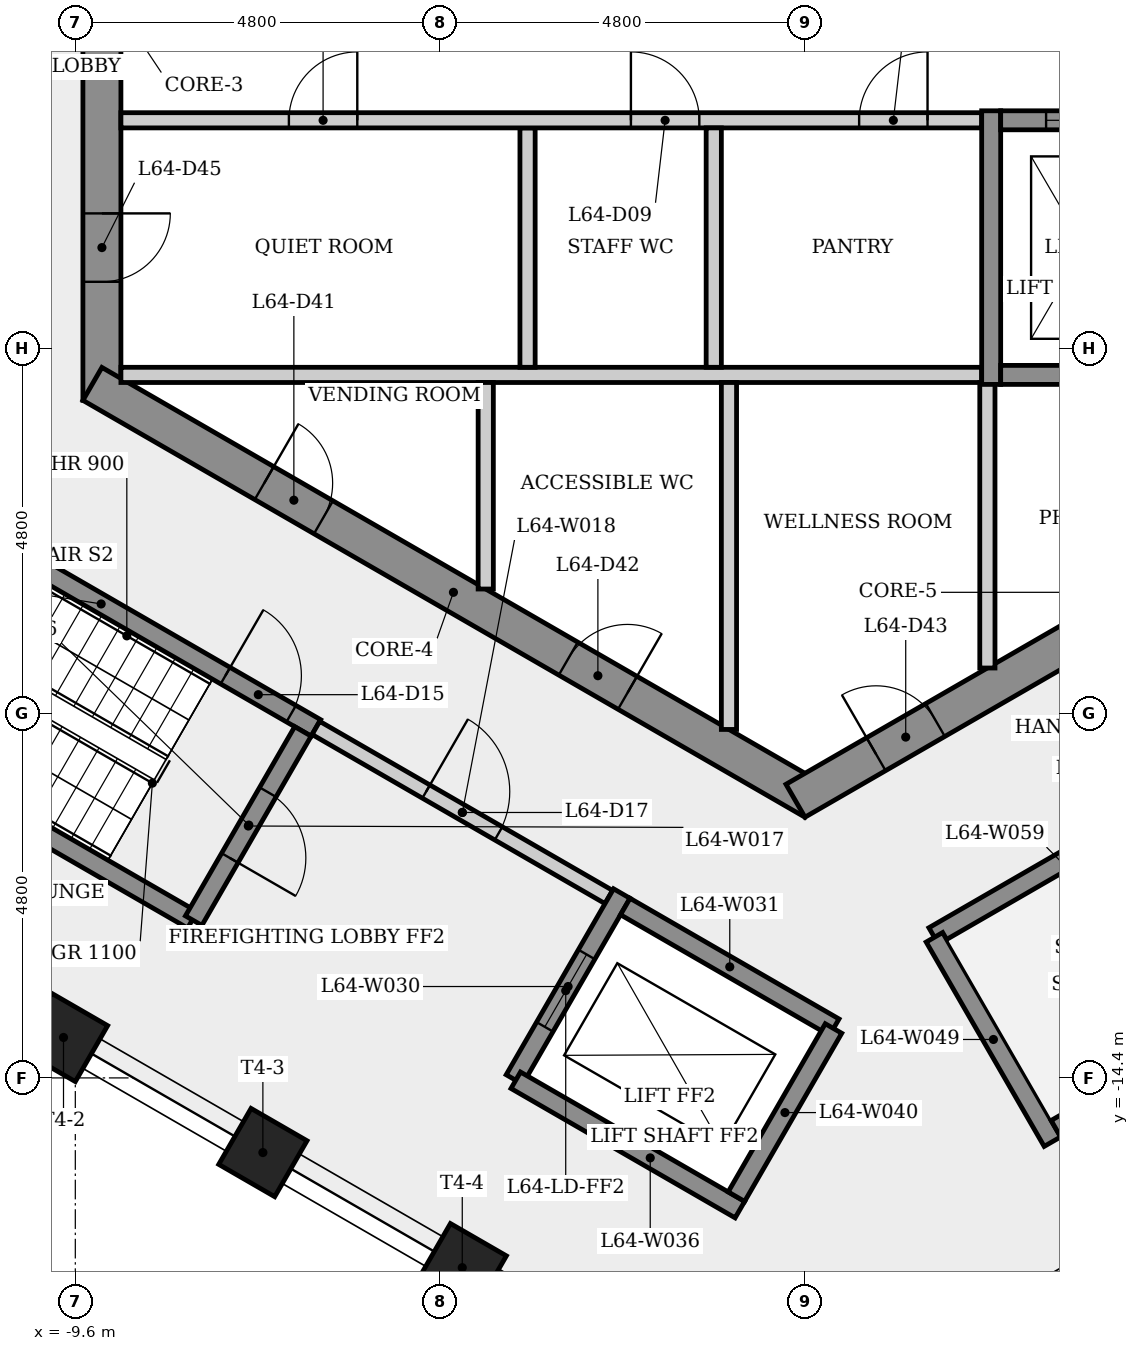
"""IFC4 building model, lengths in metres.
Left out: names, types, materials, properties, quantities, classifications, styles, units other than length and angle.
Written with IfcOpenShell. Run it as: python <this file> out.ifc"""

import sys

from ifc_helpers import new_model, si_unit, direction, frame, frame_2d, origin, origin_2d, place, context, subcontext, project, spatial, rectangle, extrude, element, fill, save


model = new_model("IFC4")
c1 = context("Model", 3, precision=1e-05, world=origin(), true_north=direction((0.0, 1.0)))
c2 = subcontext(c1, "Body", "Model", "MODEL_VIEW")
j1 = project(units=[si_unit("LENGTHUNIT", "METRE"), si_unit("PLANEANGLEUNIT", "RADIAN")], contexts=[c1])
p1 = place(None, origin())
s1 = spatial("IfcSite", under=j1, at=p1, CompositionType="ELEMENT")
p2 = place(p1, origin())
s2 = spatial("IfcBuilding", under=s1, at=p2, CompositionType="ELEMENT")
p3 = place(p2, frame((0.0, 0.0, 239.3)))
s3 = spatial("IfcBuildingStorey", under=s2, at=p3, CompositionType="ELEMENT", Elevation=239.3)
p4 = place(p3, frame((-9.25, 5.485, 0.0), z_axis=(0.0, 0.0, 1.0), x_axis=(0.0, -1.0, 0.0)))
e1 = element("IfcWall", 1, at=p4, inside=s3, PredefinedType="SHEAR", context=c2, shape_type="SweptSolid", body=[
    extrude(rectangle(XDim=10.97, YDim=0.5, at=frame_2d((5.485, 0.0))), origin(), (0.0, 0.0, 1.0), 3.4),
])
p5 = place(p4, frame((8.51, 0.0, 0.0)))
e2 = element("IfcOpeningElement", 2, at=p5, cuts=e1, PredefinedType="OPENING", context=c2, shape_type="SweptSolid", body=[
    extrude(rectangle(XDim=0.9, YDim=2.1, at=frame_2d((0.45, 1.05))), frame((0.0, 0.26, 0.0), z_axis=(0.0, -1.0, 0.0), x_axis=(1.0, 0.0, 0.0)), (0.0, 0.0, 1.0), 0.52),
])
p6 = place(p4, frame((4.685, 0.0, 0.0)))
e3 = element("IfcOpeningElement", 3, at=p6, cuts=e1, PredefinedType="OPENING", context=c2, shape_type="SweptSolid", body=[
    extrude(rectangle(XDim=1.6, YDim=2.1, at=frame_2d((0.8, 1.05))), frame((0.0, 0.26, 0.0), z_axis=(0.0, -1.0, 0.0), x_axis=(1.0, 0.0, 0.0)), (0.0, 0.0, 1.0), 0.52),
])
p7 = place(p3, frame((-9.375, -5.268, 0.0), z_axis=(0.0, 0.0, 1.0), x_axis=(0.866023993627, -0.500002442456, 0.0)))
e4 = element("IfcWall", 4, at=p7, inside=s3, PredefinedType="SHEAR", context=c2, shape_type="SweptSolid", body=[
    extrude(rectangle(XDim=10.97, YDim=0.5, at=frame_2d((5.485, 0.0))), origin(), (0.0, 0.0, 1.0), 3.4),
])
p8 = place(p7, frame((2.611, 0.0, 0.0)))
e5 = element("IfcOpeningElement", 5, at=p8, cuts=e4, PredefinedType="OPENING", context=c2, shape_type="SweptSolid", body=[
    extrude(rectangle(XDim=0.9, YDim=2.1, at=frame_2d((0.45, 1.05))), frame((0.0, 0.26, 0.0), z_axis=(0.0, -1.0, 0.0), x_axis=(1.0, 0.0, 0.0)), (0.0, 0.0, 1.0), 0.52),
])
p9 = place(p7, frame((7.229, 0.0, 0.0)))
e6 = element("IfcOpeningElement", 6, at=p9, cuts=e4, PredefinedType="OPENING", context=c2, shape_type="SweptSolid", body=[
    extrude(rectangle(XDim=0.9, YDim=2.1, at=frame_2d((0.45, 1.05))), frame((0.0, 0.26, 0.0), z_axis=(0.0, -1.0, 0.0), x_axis=(1.0, 0.0, 0.0)), (0.0, 0.0, 1.0), 0.52),
])
p10 = place(p3, frame((-0.125, -10.753, 0.0), z_axis=(0.0, 0.0, 1.0), x_axis=(0.866023993627, 0.500002442456, 0.0)))
e7 = element("IfcWall", 7, at=p10, inside=s3, PredefinedType="SHEAR", context=c2, shape_type="SweptSolid", body=[
    extrude(rectangle(XDim=10.97, YDim=0.5, at=frame_2d((5.485, 0.0))), origin(), (0.0, 0.0, 1.0), 3.4),
])
p11 = place(p10, frame((1.225, 0.0, 0.0)))
e8 = element("IfcOpeningElement", 8, at=p11, cuts=e7, PredefinedType="OPENING", context=c2, shape_type="SweptSolid", body=[
    extrude(rectangle(XDim=0.9, YDim=2.1, at=frame_2d((0.45, 1.05))), frame((0.0, 0.26, 0.0), z_axis=(0.0, -1.0, 0.0), x_axis=(1.0, 0.0, 0.0)), (0.0, 0.0, 1.0), 0.52),
])
p12 = place(p10, frame((8.119, 0.0, 0.0)))
e9 = element("IfcOpeningElement", 9, at=p12, cuts=e7, PredefinedType="OPENING", context=c2, shape_type="SweptSolid", body=[
    extrude(rectangle(XDim=0.9, YDim=2.1, at=frame_2d((0.45, 1.05))), frame((0.0, 0.26, 0.0), z_axis=(0.0, -1.0, 0.0), x_axis=(1.0, 0.0, 0.0)), (0.0, 0.0, 1.0), 0.52),
])
for number, where, z_axis, x_axis in (
    (10, (-9.755, -13.868, 0.0), (0.0, 0.0, 1.0), (-0.5, -0.866, 0.0)),
    (11, (-7.132, -15.382, 0.0), (0.0, 0.0, 1.0), (-0.5, -0.866, 0.0)),
    (12, (-4.509, -16.897, 0.0), (0.0, 0.0, 1.0), (-0.5, -0.866, 0.0)),
):
    element("IfcColumn", number, at=place(p3, frame(where, z_axis=z_axis, x_axis=x_axis)), inside=s3, PredefinedType="COLUMN", context=c2, shape_type="SweptSolid", body=[
        extrude(rectangle(XDim=0.85, YDim=0.85, at=origin_2d()), origin(), (0.0, 0.0, 1.0), 3.4),
    ])
p13 = place(p3, frame((-12.085, -6.532, 0.0), z_axis=(0.0, 0.0, 1.0), x_axis=(0.866031063448, -0.499990197047, 0.0)))
e13 = element("IfcWall", 13, at=p13, inside=s3, PredefinedType="SHEAR", context=c2, shape_type="SweptSolid", body=[
    extrude(rectangle(XDim=6.525, YDim=0.25, at=frame_2d((3.263, 0.0))), origin(), (0.0, 0.0, 1.0), 3.05),
])
p14 = place(p13, frame((5.15, 0.0, 0.0)))
e14 = element("IfcOpeningElement", 14, at=p14, cuts=e13, PredefinedType="OPENING", context=c2, shape_type="SweptSolid", body=[
    extrude(rectangle(XDim=1.0, YDim=2.1, at=frame_2d((0.5, 1.05))), frame((0.0, 0.135, 0.0), z_axis=(0.0, -1.0, 0.0), x_axis=(1.0, 0.0, 0.0)), (0.0, 0.0, 1.0), 0.27),
])
p15 = place(p3, frame((-9.0, -5.15, 0.0), z_axis=(0.0, 0.0, 1.0), x_axis=(1.0, 0.0, 0.0)))
e15 = element("IfcWall", 15, at=p15, inside=s3, PredefinedType="PARTITIONING", context=c2, shape_type="SweptSolid", body=[
    extrude(rectangle(XDim=11.325, YDim=0.2, at=frame_2d((5.663, 0.0))), origin(), (0.0, 0.0, 1.0), 3.05),
])
p16 = place(p3, frame((-8.06, -12.321, 0.0), z_axis=(0.0, 0.0, 1.0), x_axis=(-0.866029591389, 0.499992746786, 0.0)))
e16 = element("IfcWall", 16, at=p16, inside=s3, PredefinedType="SHEAR", context=c2, shape_type="SweptSolid", body=[
    extrude(rectangle(XDim=6.255, YDim=0.25, at=frame_2d((3.127, 0.0))), origin(), (0.0, 0.0, 1.0), 3.05),
])
p17 = place(p3, frame((-6.605, -9.841, 0.0), z_axis=(0.0, 0.0, 1.0), x_axis=(-0.500011588718, -0.866018712932, 0.0)))
e17 = element("IfcWall", 17, at=p17, inside=s3, PredefinedType="SHEAR", context=c2, shape_type="SweptSolid", body=[
    extrude(rectangle(XDim=2.875, YDim=0.25, at=frame_2d((1.438, 0.0))), origin(), (0.0, 0.0, 1.0), 3.05),
])
p18 = place(p17, frame((0.923, 0.0, 0.0)))
e18 = element("IfcOpeningElement", 18, at=p18, cuts=e17, PredefinedType="OPENING", context=c2, shape_type="SweptSolid", body=[
    extrude(rectangle(XDim=1.0, YDim=2.1, at=frame_2d((0.5, 1.05))), frame((0.0, 0.135, 0.0), z_axis=(0.0, -1.0, 0.0), x_axis=(1.0, 0.0, 0.0)), (0.0, 0.0, 1.0), 0.27),
])
p19 = place(p3, frame((-6.435, -9.795, 0.0), z_axis=(0.0, 0.0, 1.0), x_axis=(0.866012907634, -0.500021643343, 0.0)))
e19 = element("IfcWall", 19, at=p19, inside=s3, PredefinedType="PARTITIONING", context=c2, shape_type="SweptSolid", body=[
    extrude(rectangle(XDim=4.45, YDim=0.2, at=frame_2d((2.225, 0.0))), origin(), (0.0, 0.0, 1.0), 3.05),
])
p20 = place(p19, frame((1.675, 0.0, 0.0)))
e20 = element("IfcOpeningElement", 20, at=p20, cuts=e19, PredefinedType="OPENING", context=c2, shape_type="SweptSolid", body=[
    extrude(rectangle(XDim=1.1, YDim=2.1, at=frame_2d((0.55, 1.05))), frame((0.0, 0.11, 0.0), z_axis=(0.0, -1.0, 0.0), x_axis=(1.0, 0.0, 0.0)), (0.0, 0.0, 1.0), 0.22),
])
p21 = place(p3, frame((-4.2, -5.25, 0.0), z_axis=(0.0, 0.0, 1.0), x_axis=(0.0, -1.0, 0.0)))
e21 = element("IfcWall", 21, at=p21, inside=s3, PredefinedType="PARTITIONING", context=c2, shape_type="SweptSolid", body=[
    extrude(rectangle(XDim=2.717, YDim=0.2, at=frame_2d((1.359, 0.0))), origin(), (0.0, 0.0, 1.0), 3.05),
])
p22 = place(p3, frame((-3.65, -1.9, 0.0), z_axis=(0.0, 0.0, 1.0), x_axis=(0.0, -1.0, 0.0)))
e22 = element("IfcWall", 22, at=p22, inside=s3, PredefinedType="PARTITIONING", context=c2, shape_type="SweptSolid", body=[
    extrude(rectangle(XDim=3.15, YDim=0.2, at=frame_2d((1.575, 0.0))), origin(), (0.0, 0.0, 1.0), 3.05),
])
p23 = place(p3, frame((-9.0, -1.8, 0.0), z_axis=(0.0, 0.0, 1.0), x_axis=(1.0, 0.0, 0.0)))
e23 = element("IfcWall", 23, at=p23, inside=s3, PredefinedType="PARTITIONING", context=c2, shape_type="SweptSolid", body=[
    extrude(rectangle(XDim=11.325, YDim=0.2, at=frame_2d((5.663, 0.0))), origin(), (0.0, 0.0, 1.0), 3.05),
])
p24 = place(p23, frame((2.21, 0.0, 0.0)))
e24 = element("IfcOpeningElement", 24, at=p24, cuts=e23, PredefinedType="OPENING", context=c2, shape_type="SweptSolid", body=[
    extrude(rectangle(XDim=0.9, YDim=2.1, at=frame_2d((0.45, 1.05))), frame((0.0, 0.11, 0.0), z_axis=(0.0, -1.0, 0.0), x_axis=(1.0, 0.0, 0.0)), (0.0, 0.0, 1.0), 0.22),
])
p25 = place(p23, frame((6.71, 0.0, 0.0)))
e25 = element("IfcOpeningElement", 25, at=p25, cuts=e23, PredefinedType="OPENING", context=c2, shape_type="SweptSolid", body=[
    extrude(rectangle(XDim=0.9, YDim=2.1, at=frame_2d((0.45, 1.05))), frame((0.0, 0.11, 0.0), z_axis=(0.0, -1.0, 0.0), x_axis=(1.0, 0.0, 0.0)), (0.0, 0.0, 1.0), 0.22),
])
p26 = place(p23, frame((9.713, 0.0, 0.0)))
e26 = element("IfcOpeningElement", 26, at=p26, cuts=e23, PredefinedType="OPENING", context=c2, shape_type="SweptSolid", body=[
    extrude(rectangle(XDim=0.9, YDim=2.1, at=frame_2d((0.45, 1.05))), frame((0.0, 0.11, 0.0), z_axis=(0.0, -1.0, 0.0), x_axis=(1.0, 0.0, 0.0)), (0.0, 0.0, 1.0), 0.22),
])
p27 = place(p3, frame((-2.41, -11.974, 0.0), z_axis=(0.0, 0.0, 1.0), x_axis=(-0.49998675294, -0.866033051843, 0.0)))
e27 = element("IfcWall", 27, at=p27, inside=s3, PredefinedType="SHEAR", context=c2, shape_type="SweptSolid", body=[
    extrude(rectangle(XDim=2.825, YDim=0.25, at=frame_2d((1.413, 0.0))), origin(), (0.0, 0.0, 1.0), 3.05),
])
p28 = place(p27, frame((0.926, 0.0, 0.0)))
e28 = element("IfcOpeningElement", 28, at=p28, cuts=e27, PredefinedType="OPENING", context=c2, shape_type="SweptSolid", body=[
    extrude(rectangle(XDim=1.1, YDim=2.1, at=frame_2d((0.55, 1.05))), frame((0.0, 0.135, 0.0), z_axis=(0.0, -1.0, 0.0), x_axis=(1.0, 0.0, 0.0)), (0.0, 0.0, 1.0), 0.27),
])
p29 = place(p3, frame((-2.364, -12.145, 0.0), z_axis=(0.0, 0.0, 1.0), x_axis=(0.866048579423, -0.499959856469, 0.0)))
e29 = element("IfcWall", 29, at=p29, inside=s3, PredefinedType="SHEAR", context=c2, shape_type="SweptSolid", body=[
    extrude(rectangle(XDim=3.175, YDim=0.25, at=frame_2d((1.587, 0.0))), origin(), (0.0, 0.0, 1.0), 3.4),
])
p30 = place(p3, frame((-1.2, -1.9, 0.0), z_axis=(0.0, 0.0, 1.0), x_axis=(0.0, -1.0, 0.0)))
e30 = element("IfcWall", 30, at=p30, inside=s3, PredefinedType="PARTITIONING", context=c2, shape_type="SweptSolid", body=[
    extrude(rectangle(XDim=3.15, YDim=0.2, at=frame_2d((1.575, 0.0))), origin(), (0.0, 0.0, 1.0), 3.05),
])
p31 = place(p3, frame((-1.0, -5.25, 0.0), z_axis=(0.0, 0.0, 1.0), x_axis=(0.0, -1.0, 0.0)))
e31 = element("IfcWall", 31, at=p31, inside=s3, PredefinedType="PARTITIONING", context=c2, shape_type="SweptSolid", body=[
    extrude(rectangle(XDim=4.565, YDim=0.2, at=frame_2d((2.282, 0.0))), origin(), (0.0, 0.0, 1.0), 3.05),
])
p32 = place(p3, frame((-0.856, -16.133, 0.0), z_axis=(0.0, 0.0, 1.0), x_axis=(-0.866032748241, 0.499987278812, 0.0)))
e32 = element("IfcWall", 32, at=p32, inside=s3, PredefinedType="SHEAR", context=c2, shape_type="SweptSolid", body=[
    extrude(rectangle(XDim=3.405, YDim=0.25, at=frame_2d((1.702, 0.0))), origin(), (0.0, 0.0, 1.0), 3.05),
])
p33 = place(p3, frame((0.375, -13.75, 0.0), z_axis=(0.0, 0.0, 1.0), x_axis=(-0.50003400563, -0.866005769735, 0.0)))
e33 = element("IfcWall", 33, at=p33, inside=s3, PredefinedType="SHEAR", context=c2, shape_type="SweptSolid", body=[
    extrude(rectangle(XDim=2.555, YDim=0.25, at=frame_2d((1.277, 0.0))), origin(), (0.0, 0.0, 1.0), 3.4),
])
p34 = place(p3, frame((1.693, -12.532, 0.0), z_axis=(0.0, 0.0, 1.0), x_axis=(0.866031063448, 0.499990197047, 0.0)))
e34 = element("IfcWall", 34, at=p34, inside=s3, PredefinedType="SHEAR", context=c2, shape_type="SweptSolid", body=[
    extrude(rectangle(XDim=6.525, YDim=0.25, at=frame_2d((3.263, 0.0))), origin(), (0.0, 0.0, 1.0), 3.05),
])
p35 = place(p34, frame((5.15, 0.0, 0.0)))
e35 = element("IfcOpeningElement", 35, at=p35, cuts=e34, PredefinedType="OPENING", context=c2, shape_type="SweptSolid", body=[
    extrude(rectangle(XDim=1.0, YDim=2.1, at=frame_2d((0.5, 1.05))), frame((0.0, 0.135, 0.0), z_axis=(0.0, -1.0, 0.0), x_axis=(1.0, 0.0, 0.0)), (0.0, 0.0, 1.0), 0.27),
])
p36 = place(p3, frame((2.4, -5.25, 0.0), z_axis=(0.0, 0.0, 1.0), x_axis=(0.0, -1.0, 0.0)))
e36 = element("IfcWall", 36, at=p36, inside=s3, PredefinedType="PARTITIONING", context=c2, shape_type="SweptSolid", body=[
    extrude(rectangle(XDim=3.757, YDim=0.2, at=frame_2d((1.878, 0.0))), origin(), (0.0, 0.0, 1.0), 3.05),
])
p37 = place(p3, frame((2.45, -5.275, 0.0), z_axis=(0.0, 0.0, 1.0), x_axis=(0.0, 1.0, 0.0)))
e37 = element("IfcWall", 37, at=p37, inside=s3, PredefinedType="SHEAR", context=c2, shape_type="SweptSolid", body=[
    extrude(rectangle(XDim=3.6, YDim=0.25, at=frame_2d((1.8, 0.0))), origin(), (0.0, 0.0, 1.0), 3.05),
])
p38 = place(p3, frame((3.256, -15.239, 0.0), z_axis=(0.0, 0.0, 1.0), x_axis=(-0.500003782172, 0.866023220135, 0.0)))
e38 = element("IfcWall", 38, at=p38, inside=s3, PredefinedType="SHEAR", context=c2, shape_type="SweptSolid", body=[
    extrude(rectangle(XDim=3.105, YDim=0.25, at=frame_2d((1.552, 0.0))), origin(), (0.0, 0.0, 1.0), 3.05),
])
p39 = place(p3, frame((2.575, -5.15, 0.0), z_axis=(0.0, 0.0, 1.0), x_axis=(1.0, 0.0, 0.0)))
e39 = element("IfcWall", 39, at=p39, inside=s3, PredefinedType="SHEAR", context=c2, shape_type="SweptSolid", body=[
    extrude(rectangle(XDim=4.9, YDim=0.25, at=frame_2d((2.45, 0.0))), origin(), (0.0, 0.0, 1.0), 3.05),
])
p40 = place(p3, frame((2.575, -1.8, 0.0), z_axis=(0.0, 0.0, 1.0), x_axis=(1.0, 0.0, 0.0)))
e40 = element("IfcWall", 40, at=p40, inside=s3, PredefinedType="SHEAR", context=c2, shape_type="SweptSolid", body=[
    extrude(rectangle(XDim=4.9, YDim=0.25, at=frame_2d((2.45, 0.0))), origin(), (0.0, 0.0, 1.0), 3.05),
])
p41 = place(p40, frame((0.597, 0.0, 0.0)))
e41 = element("IfcOpeningElement", 41, at=p41, cuts=e40, PredefinedType="OPENING", context=c2, shape_type="SweptSolid", body=[
    extrude(rectangle(XDim=1.1, YDim=2.1, at=frame_2d((0.55, 1.05))), frame((0.0, 0.135, 0.0), z_axis=(0.0, -1.0, 0.0), x_axis=(1.0, 0.0, 0.0)), (0.0, 0.0, 1.0), 0.27),
])
p42 = place(p3, frame((7.073, -12.891, 0.0), z_axis=(0.0, 0.0, 1.0), x_axis=(-0.866023145199, -0.500003911965, 0.0)))
e42 = element("IfcWall", 42, at=p42, inside=s3, PredefinedType="SHEAR", context=c2, shape_type="SweptSolid", body=[
    extrude(rectangle(XDim=4.355, YDim=0.25, at=frame_2d((2.177, 0.0))), origin(), (0.0, 0.0, 1.0), 3.05),
])
p43 = place(p41, origin())
e43 = element("IfcDoor", 43, at=p43, inside=s3, OperationType="SLIDING_TO_LEFT", PredefinedType="DOOR", context=c2, shape_type="SweptSolid", body=[
    extrude(rectangle(XDim=1.1, YDim=2.1, at=frame_2d((0.55, 1.05))), frame((0.0, 0.025, 0.0), z_axis=(0.0, -1.0, 0.0), x_axis=(1.0, 0.0, 0.0)), (0.0, 0.0, 1.0), 0.05),
])
fill(e41, e43)
p44 = place(p24, origin())
e44 = element("IfcDoor", 44, at=p44, inside=s3, OperationType="SINGLE_SWING_RIGHT", PredefinedType="DOOR", context=c2, shape_type="SweptSolid", body=[
    extrude(rectangle(XDim=0.9, YDim=2.1, at=frame_2d((0.45, 1.05))), frame((0.0, 0.025, 0.0), z_axis=(0.0, -1.0, 0.0), x_axis=(1.0, 0.0, 0.0)), (0.0, 0.0, 1.0), 0.05),
])
fill(e24, e44)
p45 = place(p25, origin())
e45 = element("IfcDoor", 45, at=p45, inside=s3, OperationType="SINGLE_SWING_LEFT", PredefinedType="DOOR", context=c2, shape_type="SweptSolid", body=[
    extrude(rectangle(XDim=0.9, YDim=2.1, at=frame_2d((0.45, 1.05))), frame((0.0, 0.025, 0.0), z_axis=(0.0, -1.0, 0.0), x_axis=(1.0, 0.0, 0.0)), (0.0, 0.0, 1.0), 0.05),
])
fill(e25, e45)
p46 = place(p26, origin())
e46 = element("IfcDoor", 46, at=p46, inside=s3, OperationType="SINGLE_SWING_RIGHT", PredefinedType="DOOR", context=c2, shape_type="SweptSolid", body=[
    extrude(rectangle(XDim=0.9, YDim=2.1, at=frame_2d((0.45, 1.05))), frame((0.0, 0.025, 0.0), z_axis=(0.0, -1.0, 0.0), x_axis=(1.0, 0.0, 0.0)), (0.0, 0.0, 1.0), 0.05),
])
fill(e26, e46)
p47 = place(p14, origin())
e47 = element("IfcDoor", 47, at=p47, inside=s3, OperationType="SINGLE_SWING_LEFT", PredefinedType="DOOR", context=c2, shape_type="SweptSolid", body=[
    extrude(rectangle(XDim=1.0, YDim=2.1, at=frame_2d((0.5, 1.05))), frame((0.0, 0.025, 0.0), z_axis=(0.0, -1.0, 0.0), x_axis=(1.0, 0.0, 0.0)), (0.0, 0.0, 1.0), 0.05),
])
fill(e14, e47)
p48 = place(p18, origin())
e48 = element("IfcDoor", 48, at=p48, inside=s3, OperationType="SINGLE_SWING_RIGHT", PredefinedType="DOOR", context=c2, shape_type="SweptSolid", body=[
    extrude(rectangle(XDim=1.0, YDim=2.1, at=frame_2d((0.5, 1.05))), frame((0.0, 0.025, 0.0), z_axis=(0.0, -1.0, 0.0), x_axis=(1.0, 0.0, 0.0)), (0.0, 0.0, 1.0), 0.05),
])
fill(e18, e48)
p49 = place(p20, origin())
e49 = element("IfcDoor", 49, at=p49, inside=s3, OperationType="SINGLE_SWING_LEFT", PredefinedType="DOOR", context=c2, shape_type="SweptSolid", body=[
    extrude(rectangle(XDim=1.1, YDim=2.1, at=frame_2d((0.55, 1.05))), frame((0.0, 0.025, 0.0), z_axis=(0.0, -1.0, 0.0), x_axis=(1.0, 0.0, 0.0)), (0.0, 0.0, 1.0), 0.05),
])
fill(e20, e49)
p50 = place(p28, origin())
e50 = element("IfcDoor", 50, at=p50, inside=s3, OperationType="SLIDING_TO_LEFT", PredefinedType="DOOR", context=c2, shape_type="SweptSolid", body=[
    extrude(rectangle(XDim=1.1, YDim=2.1, at=frame_2d((0.55, 1.05))), frame((0.0, 0.025, 0.0), z_axis=(0.0, -1.0, 0.0), x_axis=(1.0, 0.0, 0.0)), (0.0, 0.0, 1.0), 0.05),
])
fill(e28, e50)
p51 = place(p8, origin())
e51 = element("IfcDoor", 51, at=p51, inside=s3, OperationType="SINGLE_SWING_LEFT", PredefinedType="DOOR", context=c2, shape_type="SweptSolid", body=[
    extrude(rectangle(XDim=0.9, YDim=2.1, at=frame_2d((0.45, 1.05))), frame((0.0, 0.025, 0.0), z_axis=(0.0, -1.0, 0.0), x_axis=(1.0, 0.0, 0.0)), (0.0, 0.0, 1.0), 0.05),
])
fill(e5, e51)
p52 = place(p9, origin())
e52 = element("IfcDoor", 52, at=p52, inside=s3, OperationType="SINGLE_SWING_RIGHT", PredefinedType="DOOR", context=c2, shape_type="SweptSolid", body=[
    extrude(rectangle(XDim=0.9, YDim=2.1, at=frame_2d((0.45, 1.05))), frame((0.0, 0.025, 0.0), z_axis=(0.0, -1.0, 0.0), x_axis=(1.0, 0.0, 0.0)), (0.0, 0.0, 1.0), 0.05),
])
fill(e6, e52)
p53 = place(p11, origin())
e53 = element("IfcDoor", 53, at=p53, inside=s3, OperationType="SINGLE_SWING_LEFT", PredefinedType="DOOR", context=c2, shape_type="SweptSolid", body=[
    extrude(rectangle(XDim=0.9, YDim=2.1, at=frame_2d((0.45, 1.05))), frame((0.0, 0.025, 0.0), z_axis=(0.0, -1.0, 0.0), x_axis=(1.0, 0.0, 0.0)), (0.0, 0.0, 1.0), 0.05),
])
fill(e8, e53)
p54 = place(p5, origin())
e54 = element("IfcDoor", 54, at=p54, inside=s3, OperationType="SINGLE_SWING_LEFT", PredefinedType="DOOR", context=c2, shape_type="SweptSolid", body=[
    extrude(rectangle(XDim=0.9, YDim=2.1, at=frame_2d((0.45, 1.05))), frame((0.0, 0.025, 0.0), z_axis=(0.0, -1.0, 0.0), x_axis=(1.0, 0.0, 0.0)), (0.0, 0.0, 1.0), 0.05),
])
fill(e2, e54)
save(model, sys.argv[1])
